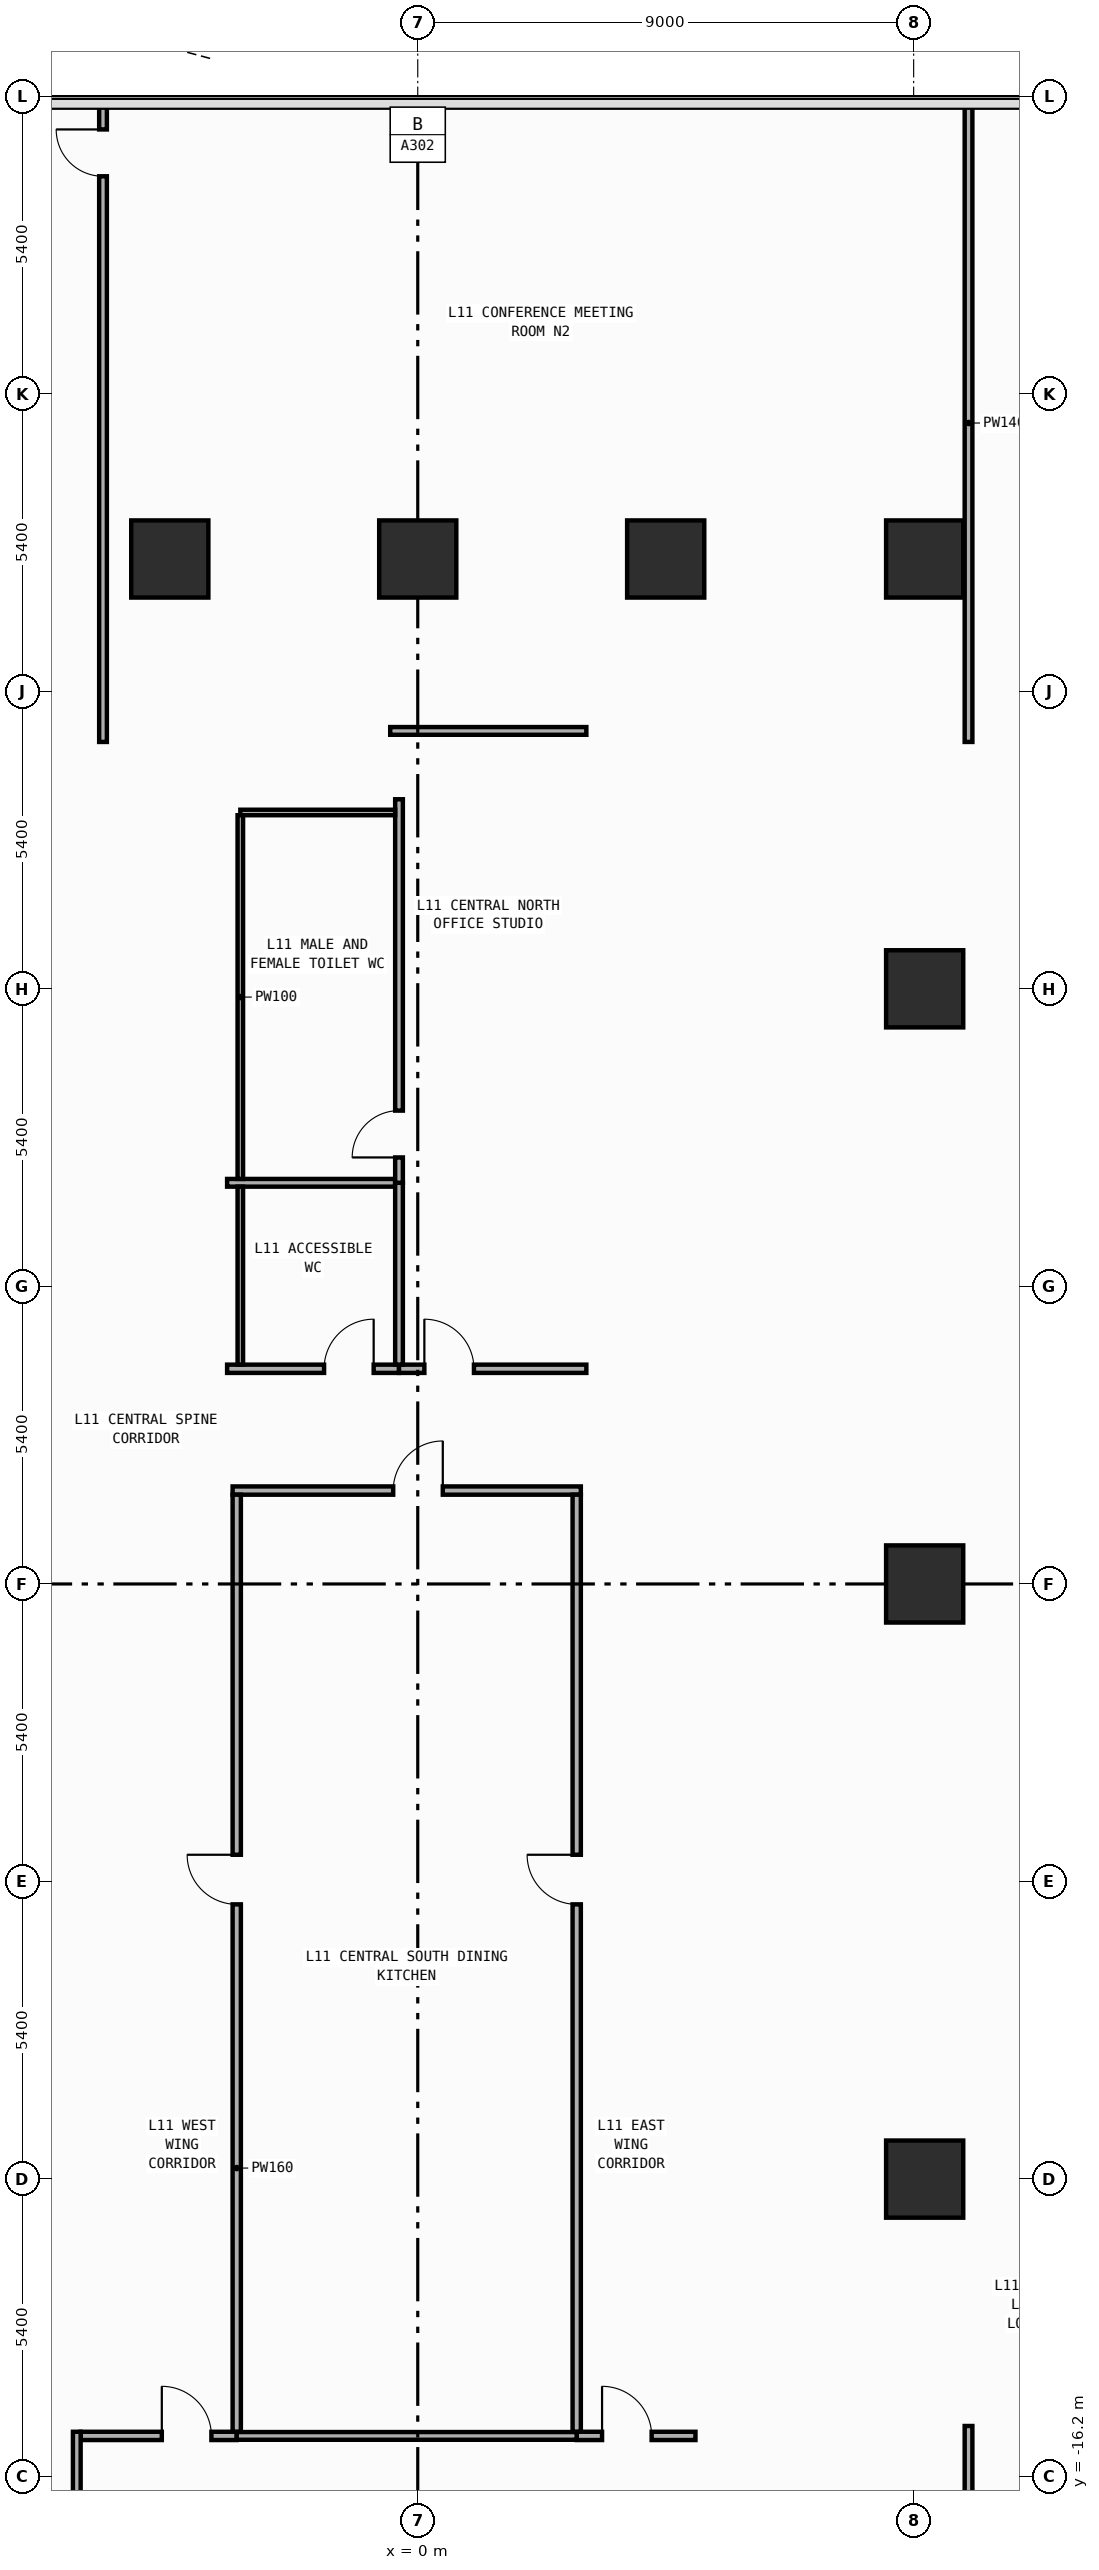
"""IFC4 building model, lengths in metres.
Left out: names, types, materials, properties, quantities, classifications, styles, units other than length and angle.
Written with IfcOpenShell. Run it as: python <this file> out.ifc"""

import sys

from ifc_helpers import new_model, si_unit, direction, frame, frame_2d, origin, origin_2d, place, context, subcontext, project, spatial, rectangle, extrude, element, fill, save


model = new_model("IFC4")
c1 = context("Model", 3, precision=1e-05, world=origin(), true_north=direction((0.0, 1.0)))
c2 = subcontext(c1, "Body", "Model", "MODEL_VIEW")
j1 = project(units=[si_unit("LENGTHUNIT", "METRE"), si_unit("PLANEANGLEUNIT", "RADIAN")], contexts=[c1])
p1 = place(None, origin())
s1 = spatial("IfcSite", under=j1, at=p1, CompositionType="ELEMENT")
p2 = place(p1, origin())
s2 = spatial("IfcBuilding", under=s1, at=p2, CompositionType="ELEMENT")
p3 = place(p2, frame((0.0, 0.0, 47.0)))
s3 = spatial("IfcBuildingStorey", under=s2, at=p3, CompositionType="ELEMENT", Elevation=47.0)
for number, where, z_axis, x_axis in (
    (1, (9.2, -10.8, 0.0), (0.0, 0.0, 1.0), (1.0, 0.0, 0.0)),
    (2, (9.2, 0.0, 0.0), (0.0, 0.0, 1.0), (1.0, 0.0, 0.0)),
    (3, (9.2, 10.8, 0.0), (0.0, 0.0, 1.0), (1.0, 0.0, 0.0)),
    (4, (9.2, 18.6, 0.0), (0.0, 0.0, 1.0), (1.0, 0.0, 0.0)),
    (5, (-4.5, 18.6, 0.0), (0.0, 0.0, 1.0), (1.0, 0.0, 0.0)),
    (6, (0.0, 18.6, 0.0), (0.0, 0.0, 1.0), (1.0, 0.0, 0.0)),
    (7, (4.5, 18.6, 0.0), (0.0, 0.0, 1.0), (1.0, 0.0, 0.0)),
):
    element("IfcColumn", number, at=place(p3, frame(where, z_axis=z_axis, x_axis=x_axis)), inside=s3, PredefinedType="COLUMN", context=c2, shape_type="SweptSolid", body=[
        extrude(rectangle(XDim=1.4, YDim=1.4, at=origin_2d()), origin(), (0.0, 0.0, 1.0), 4.2),
    ])
p4 = place(p3, frame((-3.46, 3.905, 0.0), z_axis=(0.0, 0.0, 1.0), x_axis=(1.0, 0.0, 0.0)))
e8 = element("IfcWall", 8, at=p4, inside=s3, PredefinedType="PARTITIONING", context=c2, shape_type="SweptSolid", body=[
    extrude(rectangle(XDim=3.12, YDim=0.15, at=frame_2d((1.56, 0.0))), origin(), (0.0, 0.0, 1.0), 3.94),
])
p5 = place(p4, frame((1.76, 0.0, 0.0)))
e9 = element("IfcOpeningElement", 9, at=p5, cuts=e8, PredefinedType="OPENING", context=c2, shape_type="SweptSolid", body=[
    extrude(rectangle(XDim=0.9, YDim=2.15, at=frame_2d((0.45, 1.075))), frame((0.0, 0.085, 0.0), z_axis=(0.0, -1.0, 0.0), x_axis=(1.0, 0.0, 0.0)), (0.0, 0.0, 1.0), 0.17),
])
p6 = place(p3, frame((-0.34, 3.905, 0.0), z_axis=(0.0, 0.0, 1.0), x_axis=(1.0, 0.0, 0.0)))
e10 = element("IfcWall", 10, at=p6, inside=s3, PredefinedType="PARTITIONING", context=c2, shape_type="SweptSolid", body=[
    extrude(rectangle(XDim=3.4, YDim=0.15, at=frame_2d((1.7, 0.0))), origin(), (0.0, 0.0, 1.0), 3.94),
])
p7 = place(p6, frame((0.46, 0.0, 0.0)))
e11 = element("IfcOpeningElement", 11, at=p7, cuts=e10, PredefinedType="OPENING", context=c2, shape_type="SweptSolid", body=[
    extrude(rectangle(XDim=0.9, YDim=2.15, at=frame_2d((0.45, 1.075))), frame((0.0, 0.085, 0.0), z_axis=(0.0, -1.0, 0.0), x_axis=(1.0, 0.0, 0.0)), (0.0, 0.0, 1.0), 0.17),
])
p8 = place(p3, frame((-3.36, 1.695, 0.0), z_axis=(0.0, 0.0, 1.0), x_axis=(1.0, 0.0, 0.0)))
e12 = element("IfcWall", 12, at=p8, inside=s3, PredefinedType="PARTITIONING", context=c2, shape_type="SweptSolid", body=[
    extrude(rectangle(XDim=6.32, YDim=0.15, at=frame_2d((3.16, 0.0))), origin(), (0.0, 0.0, 1.0), 3.94),
])
p9 = place(p8, frame((2.915, 0.0, 0.0)))
e13 = element("IfcOpeningElement", 13, at=p9, cuts=e12, PredefinedType="OPENING", context=c2, shape_type="SweptSolid", body=[
    extrude(rectangle(XDim=0.9, YDim=2.15, at=frame_2d((0.45, 1.075))), frame((0.0, 0.085, 0.0), z_axis=(0.0, -1.0, 0.0), x_axis=(1.0, 0.0, 0.0)), (0.0, 0.0, 1.0), 0.17),
])
p10 = place(p3, frame((-6.118, -15.46, 0.0), z_axis=(0.0, 0.0, 1.0), x_axis=(1.0, 0.0, 0.0)))
e14 = element("IfcWall", 14, at=p10, inside=s3, PredefinedType="PARTITIONING", context=c2, shape_type="SweptSolid", body=[
    extrude(rectangle(XDim=2.833, YDim=0.15, at=frame_2d((1.417, 0.0))), origin(), (0.0, 0.0, 1.0), 3.94),
])
p11 = place(p10, frame((1.473, 0.0, 0.0)))
e15 = element("IfcOpeningElement", 15, at=p11, cuts=e14, PredefinedType="OPENING", context=c2, shape_type="SweptSolid", body=[
    extrude(rectangle(XDim=0.9, YDim=2.15, at=frame_2d((0.45, 1.075))), frame((0.0, 0.085, 0.0), z_axis=(0.0, -1.0, 0.0), x_axis=(1.0, 0.0, 0.0)), (0.0, 0.0, 1.0), 0.17),
])
p12 = place(p3, frame((-3.285, -15.385, 0.0), z_axis=(0.0, 0.0, 1.0), x_axis=(0.0, 1.0, 0.0)))
e16 = element("IfcWall", 16, at=p12, inside=s3, PredefinedType="PARTITIONING", context=c2, shape_type="SweptSolid", body=[
    extrude(rectangle(XDim=17.005, YDim=0.15, at=frame_2d((8.502, 0.0))), origin(), (0.0, 0.0, 1.0), 3.94),
])
p13 = place(p12, frame((9.571, 0.0, 0.0)))
e17 = element("IfcOpeningElement", 17, at=p13, cuts=e16, PredefinedType="OPENING", context=c2, shape_type="SweptSolid", body=[
    extrude(rectangle(XDim=0.9, YDim=2.15, at=frame_2d((0.45, 1.075))), frame((0.0, 0.085, 0.0), z_axis=(0.0, -1.0, 0.0), x_axis=(1.0, 0.0, 0.0)), (0.0, 0.0, 1.0), 0.17),
])
p14 = place(p3, frame((2.885, -15.46, 0.0), z_axis=(0.0, 0.0, 1.0), x_axis=(1.0, 0.0, 0.0)))
e18 = element("IfcWall", 18, at=p14, inside=s3, PredefinedType="PARTITIONING", context=c2, shape_type="SweptSolid", body=[
    extrude(rectangle(XDim=2.155, YDim=0.15, at=frame_2d((1.078, 0.0))), origin(), (0.0, 0.0, 1.0), 3.94),
])
p15 = place(p14, frame((0.46, 0.0, 0.0)))
e19 = element("IfcOpeningElement", 19, at=p15, cuts=e18, PredefinedType="OPENING", context=c2, shape_type="SweptSolid", body=[
    extrude(rectangle(XDim=0.9, YDim=2.15, at=frame_2d((0.45, 1.075))), frame((0.0, 0.085, 0.0), z_axis=(0.0, -1.0, 0.0), x_axis=(1.0, 0.0, 0.0)), (0.0, 0.0, 1.0), 0.17),
])
p16 = place(p3, frame((2.885, -15.385, 0.0), z_axis=(0.0, 0.0, 1.0), x_axis=(0.0, 1.0, 0.0)))
e20 = element("IfcWall", 20, at=p16, inside=s3, PredefinedType="PARTITIONING", context=c2, shape_type="SweptSolid", body=[
    extrude(rectangle(XDim=17.005, YDim=0.15, at=frame_2d((8.502, 0.0))), origin(), (0.0, 0.0, 1.0), 3.94),
])
p17 = place(p16, frame((9.571, 0.0, 0.0)))
e21 = element("IfcOpeningElement", 21, at=p17, cuts=e20, PredefinedType="OPENING", context=c2, shape_type="SweptSolid", body=[
    extrude(rectangle(XDim=0.9, YDim=2.15, at=frame_2d((0.45, 1.075))), frame((0.0, 0.085, 0.0), z_axis=(0.0, -1.0, 0.0), x_axis=(1.0, 0.0, 0.0)), (0.0, 0.0, 1.0), 0.17),
])
p18 = place(p3, frame((-5.712, 15.28, 0.0), z_axis=(0.0, 0.0, 1.0), x_axis=(0.0, 1.0, 0.0)))
e22 = element("IfcWall", 22, at=p18, inside=s3, PredefinedType="PARTITIONING", context=c2, shape_type="SweptSolid", body=[
    extrude(rectangle(XDim=11.575, YDim=0.14, at=frame_2d((5.788, 0.0))), origin(), (0.0, 0.0, 1.0), 3.94),
])
p19 = place(p18, frame((10.265, 0.0, 0.0)))
e23 = element("IfcOpeningElement", 23, at=p19, cuts=e22, PredefinedType="OPENING", context=c2, shape_type="SweptSolid", body=[
    extrude(rectangle(XDim=0.85, YDim=2.1, at=frame_2d((0.425, 1.05))), frame((0.0, 0.08, 0.0), z_axis=(0.0, -1.0, 0.0), x_axis=(1.0, 0.0, 0.0)), (0.0, 0.0, 1.0), 0.16),
])
p20 = place(p3, frame((9.996, 15.28, 0.0), z_axis=(0.0, 0.0, 1.0), x_axis=(0.0, 1.0, 0.0)))
e24 = element("IfcWall", 24, at=p20, inside=s3, PredefinedType="PARTITIONING", context=c2, shape_type="SweptSolid", body=[
    extrude(rectangle(XDim=11.575, YDim=0.14, at=frame_2d((5.788, 0.0))), origin(), (0.0, 0.0, 1.0), 3.94),
])
p21 = place(p3, frame((-0.5, 15.48, 0.0), z_axis=(0.0, 0.0, 1.0), x_axis=(1.0, 0.0, 0.0)))
e25 = element("IfcWall", 25, at=p21, inside=s3, PredefinedType="PARTITIONING", context=c2, shape_type="SweptSolid", body=[
    extrude(rectangle(XDim=3.56, YDim=0.14, at=frame_2d((1.78, 0.0))), origin(), (0.0, 0.0, 1.0), 3.94),
])
p22 = place(p3, frame((-6.188, -26.795, 0.0), z_axis=(0.0, 0.0, 1.0), x_axis=(0.0, 1.0, 0.0)))
e26 = element("IfcWall", 26, at=p22, inside=s3, PredefinedType="PARTITIONING", context=c2, shape_type="SweptSolid", body=[
    extrude(rectangle(XDim=11.41, YDim=0.14, at=frame_2d((5.705, 0.0))), origin(), (0.0, 0.0, 1.0), 3.94),
])
p23 = place(p22, frame((0.46, 0.0, 0.0)))
e27 = element("IfcOpeningElement", 27, at=p23, cuts=e26, PredefinedType="OPENING", context=c2, shape_type="SweptSolid", body=[
    extrude(rectangle(XDim=0.85, YDim=2.1, at=frame_2d((0.425, 1.05))), frame((0.0, 0.08, 0.0), z_axis=(0.0, -1.0, 0.0), x_axis=(1.0, 0.0, 0.0)), (0.0, 0.0, 1.0), 0.16),
])
p24 = place(p3, frame((9.996, -26.716, 0.0), z_axis=(0.0, 0.0, 1.0), x_axis=(0.0, 1.0, 0.0)))
e28 = element("IfcWall", 28, at=p24, inside=s3, PredefinedType="PARTITIONING", context=c2, shape_type="SweptSolid", body=[
    extrude(rectangle(XDim=11.436, YDim=0.14, at=frame_2d((5.718, 0.0))), origin(), (0.0, 0.0, 1.0), 3.94),
])
p25 = place(p24, frame((3.078, 0.0, 0.0)))
e29 = element("IfcOpeningElement", 29, at=p25, cuts=e28, PredefinedType="OPENING", context=c2, shape_type="SweptSolid", body=[
    extrude(rectangle(XDim=0.85, YDim=2.1, at=frame_2d((0.425, 1.05))), frame((0.0, 0.08, 0.0), z_axis=(0.0, -1.0, 0.0), x_axis=(1.0, 0.0, 0.0)), (0.0, 0.0, 1.0), 0.16),
])
p26 = place(p3, frame((-3.285, -15.46, 0.0), z_axis=(0.0, 0.0, 1.0), x_axis=(1.0, 0.0, 0.0)))
e30 = element("IfcWall", 30, at=p26, inside=s3, PredefinedType="PARTITIONING", context=c2, shape_type="SweptSolid", body=[
    extrude(rectangle(XDim=6.17, YDim=0.14, at=frame_2d((3.085, 0.0))), origin(), (0.0, 0.0, 1.0), 3.94),
])
p27 = place(p3, frame((-3.46, 7.28, 0.0), z_axis=(0.0, 0.0, 1.0), x_axis=(1.0, 0.0, 0.0)))
e31 = element("IfcWall", 31, at=p27, inside=s3, PredefinedType="PARTITIONING", context=c2, shape_type="SweptSolid", body=[
    extrude(rectangle(XDim=3.05, YDim=0.14, at=frame_2d((1.525, 0.0))), origin(), (0.0, 0.0, 1.0), 3.94),
])
p28 = place(p3, frame((-0.34, 3.98, 0.0), z_axis=(0.0, 0.0, 1.0), x_axis=(0.0, 1.0, 0.0)))
e32 = element("IfcWall", 32, at=p28, inside=s3, PredefinedType="PARTITIONING", context=c2, shape_type="SweptSolid", body=[
    extrude(rectangle(XDim=3.3, YDim=0.14, at=frame_2d((1.65, 0.0))), origin(), (0.0, 0.0, 1.0), 3.94),
])
p29 = place(p3, frame((-0.34, 7.28, 0.0), z_axis=(0.0, 0.0, 1.0), x_axis=(0.0, 1.0, 0.0)))
e33 = element("IfcWall", 33, at=p29, inside=s3, PredefinedType="PARTITIONING", context=c2, shape_type="SweptSolid", body=[
    extrude(rectangle(XDim=6.96, YDim=0.14, at=frame_2d((3.48, 0.0))), origin(), (0.0, 0.0, 1.0), 3.94),
])
p30 = place(p29, frame((0.46, 0.0, 0.0)))
e34 = element("IfcOpeningElement", 34, at=p30, cuts=e33, PredefinedType="OPENING", context=c2, shape_type="SweptSolid", body=[
    extrude(rectangle(XDim=0.85, YDim=2.1, at=frame_2d((0.425, 1.05))), frame((0.0, 0.08, 0.0), z_axis=(0.0, -1.0, 0.0), x_axis=(1.0, 0.0, 0.0)), (0.0, 0.0, 1.0), 0.16),
])
p31 = place(p3, frame((-3.22, 3.98, 0.0), z_axis=(0.0, 0.0, 1.0), x_axis=(0.0, 1.0, 0.0)))
e35 = element("IfcWall", 35, at=p31, inside=s3, PredefinedType="PARTITIONING", context=c2, shape_type="SweptSolid", body=[
    extrude(rectangle(XDim=3.23, YDim=0.1, at=frame_2d((1.615, 0.0))), origin(), (0.0, 0.0, 1.0), 3.94),
])
p32 = place(p3, frame((-3.22, 14.0, 0.0), z_axis=(0.0, 0.0, 1.0), x_axis=(1.0, 0.0, 0.0)))
e36 = element("IfcWall", 36, at=p32, inside=s3, PredefinedType="PARTITIONING", context=c2, shape_type="SweptSolid", body=[
    extrude(rectangle(XDim=2.81, YDim=0.1, at=frame_2d((1.405, 0.0))), origin(), (0.0, 0.0, 1.0), 3.94),
])
p33 = place(p3, frame((-3.22, 7.35, 0.0), z_axis=(0.0, 0.0, 1.0), x_axis=(0.0, 1.0, 0.0)))
e37 = element("IfcWall", 37, at=p33, inside=s3, PredefinedType="PARTITIONING", context=c2, shape_type="SweptSolid", body=[
    extrude(rectangle(XDim=6.6, YDim=0.1, at=frame_2d((3.3, 0.0))), origin(), (0.0, 0.0, 1.0), 3.94),
])
p34 = place(p5, origin())
e38 = element("IfcDoor", 38, at=p34, inside=s3, OperationType="SINGLE_SWING_RIGHT", PredefinedType="DOOR", context=c2, shape_type="SweptSolid", body=[
    extrude(rectangle(XDim=0.9, YDim=2.15, at=frame_2d((0.45, 1.075))), frame((0.0, 0.025, 0.0), z_axis=(0.0, -1.0, 0.0), x_axis=(1.0, 0.0, 0.0)), (0.0, 0.0, 1.0), 0.05),
])
fill(e9, e38)
p35 = place(p7, origin())
e39 = element("IfcDoor", 39, at=p35, inside=s3, OperationType="SINGLE_SWING_LEFT", PredefinedType="DOOR", context=c2, shape_type="SweptSolid", body=[
    extrude(rectangle(XDim=0.9, YDim=2.15, at=frame_2d((0.45, 1.075))), frame((0.0, 0.025, 0.0), z_axis=(0.0, -1.0, 0.0), x_axis=(1.0, 0.0, 0.0)), (0.0, 0.0, 1.0), 0.05),
])
fill(e11, e39)
p36 = place(p9, origin())
e40 = element("IfcDoor", 40, at=p36, inside=s3, OperationType="SINGLE_SWING_RIGHT", PredefinedType="DOOR", context=c2, shape_type="SweptSolid", body=[
    extrude(rectangle(XDim=0.9, YDim=2.15, at=frame_2d((0.45, 1.075))), frame((0.0, 0.025, 0.0), z_axis=(0.0, -1.0, 0.0), x_axis=(1.0, 0.0, 0.0)), (0.0, 0.0, 1.0), 0.05),
])
fill(e13, e40)
p37 = place(p11, origin())
e41 = element("IfcDoor", 41, at=p37, inside=s3, OperationType="SINGLE_SWING_LEFT", PredefinedType="DOOR", context=c2, shape_type="SweptSolid", body=[
    extrude(rectangle(XDim=0.9, YDim=2.15, at=frame_2d((0.45, 1.075))), frame((0.0, 0.025, 0.0), z_axis=(0.0, -1.0, 0.0), x_axis=(1.0, 0.0, 0.0)), (0.0, 0.0, 1.0), 0.05),
])
fill(e15, e41)
p38 = place(p13, origin())
e42 = element("IfcDoor", 42, at=p38, inside=s3, OperationType="SINGLE_SWING_RIGHT", PredefinedType="DOOR", context=c2, shape_type="SweptSolid", body=[
    extrude(rectangle(XDim=0.9, YDim=2.15, at=frame_2d((0.45, 1.075))), frame((0.0, 0.025, 0.0), z_axis=(0.0, -1.0, 0.0), x_axis=(1.0, 0.0, 0.0)), (0.0, 0.0, 1.0), 0.05),
])
fill(e17, e42)
p39 = place(p15, origin())
e43 = element("IfcDoor", 43, at=p39, inside=s3, OperationType="SINGLE_SWING_LEFT", PredefinedType="DOOR", context=c2, shape_type="SweptSolid", body=[
    extrude(rectangle(XDim=0.9, YDim=2.15, at=frame_2d((0.45, 1.075))), frame((0.0, 0.025, 0.0), z_axis=(0.0, -1.0, 0.0), x_axis=(1.0, 0.0, 0.0)), (0.0, 0.0, 1.0), 0.05),
])
fill(e19, e43)
p40 = place(p17, origin())
e44 = element("IfcDoor", 44, at=p40, inside=s3, OperationType="SINGLE_SWING_RIGHT", PredefinedType="DOOR", context=c2, shape_type="SweptSolid", body=[
    extrude(rectangle(XDim=0.9, YDim=2.15, at=frame_2d((0.45, 1.075))), frame((0.0, 0.025, 0.0), z_axis=(0.0, -1.0, 0.0), x_axis=(1.0, 0.0, 0.0)), (0.0, 0.0, 1.0), 0.05),
])
fill(e21, e44)
p41 = place(p19, origin())
e45 = element("IfcDoor", 45, at=p41, inside=s3, OperationType="SINGLE_SWING_RIGHT", PredefinedType="DOOR", context=c2, shape_type="SweptSolid", body=[
    extrude(rectangle(XDim=0.85, YDim=2.1, at=frame_2d((0.425, 1.05))), frame((0.0, 0.025, 0.0), z_axis=(0.0, -1.0, 0.0), x_axis=(1.0, 0.0, 0.0)), (0.0, 0.0, 1.0), 0.05),
])
fill(e23, e45)
p42 = place(p30, origin())
e46 = element("IfcDoor", 46, at=p42, inside=s3, OperationType="SINGLE_SWING_LEFT", PredefinedType="DOOR", context=c2, shape_type="SweptSolid", body=[
    extrude(rectangle(XDim=0.85, YDim=2.1, at=frame_2d((0.425, 1.05))), frame((0.0, 0.025, 0.0), z_axis=(0.0, -1.0, 0.0), x_axis=(1.0, 0.0, 0.0)), (0.0, 0.0, 1.0), 0.05),
])
fill(e34, e46)
save(model, sys.argv[1])
